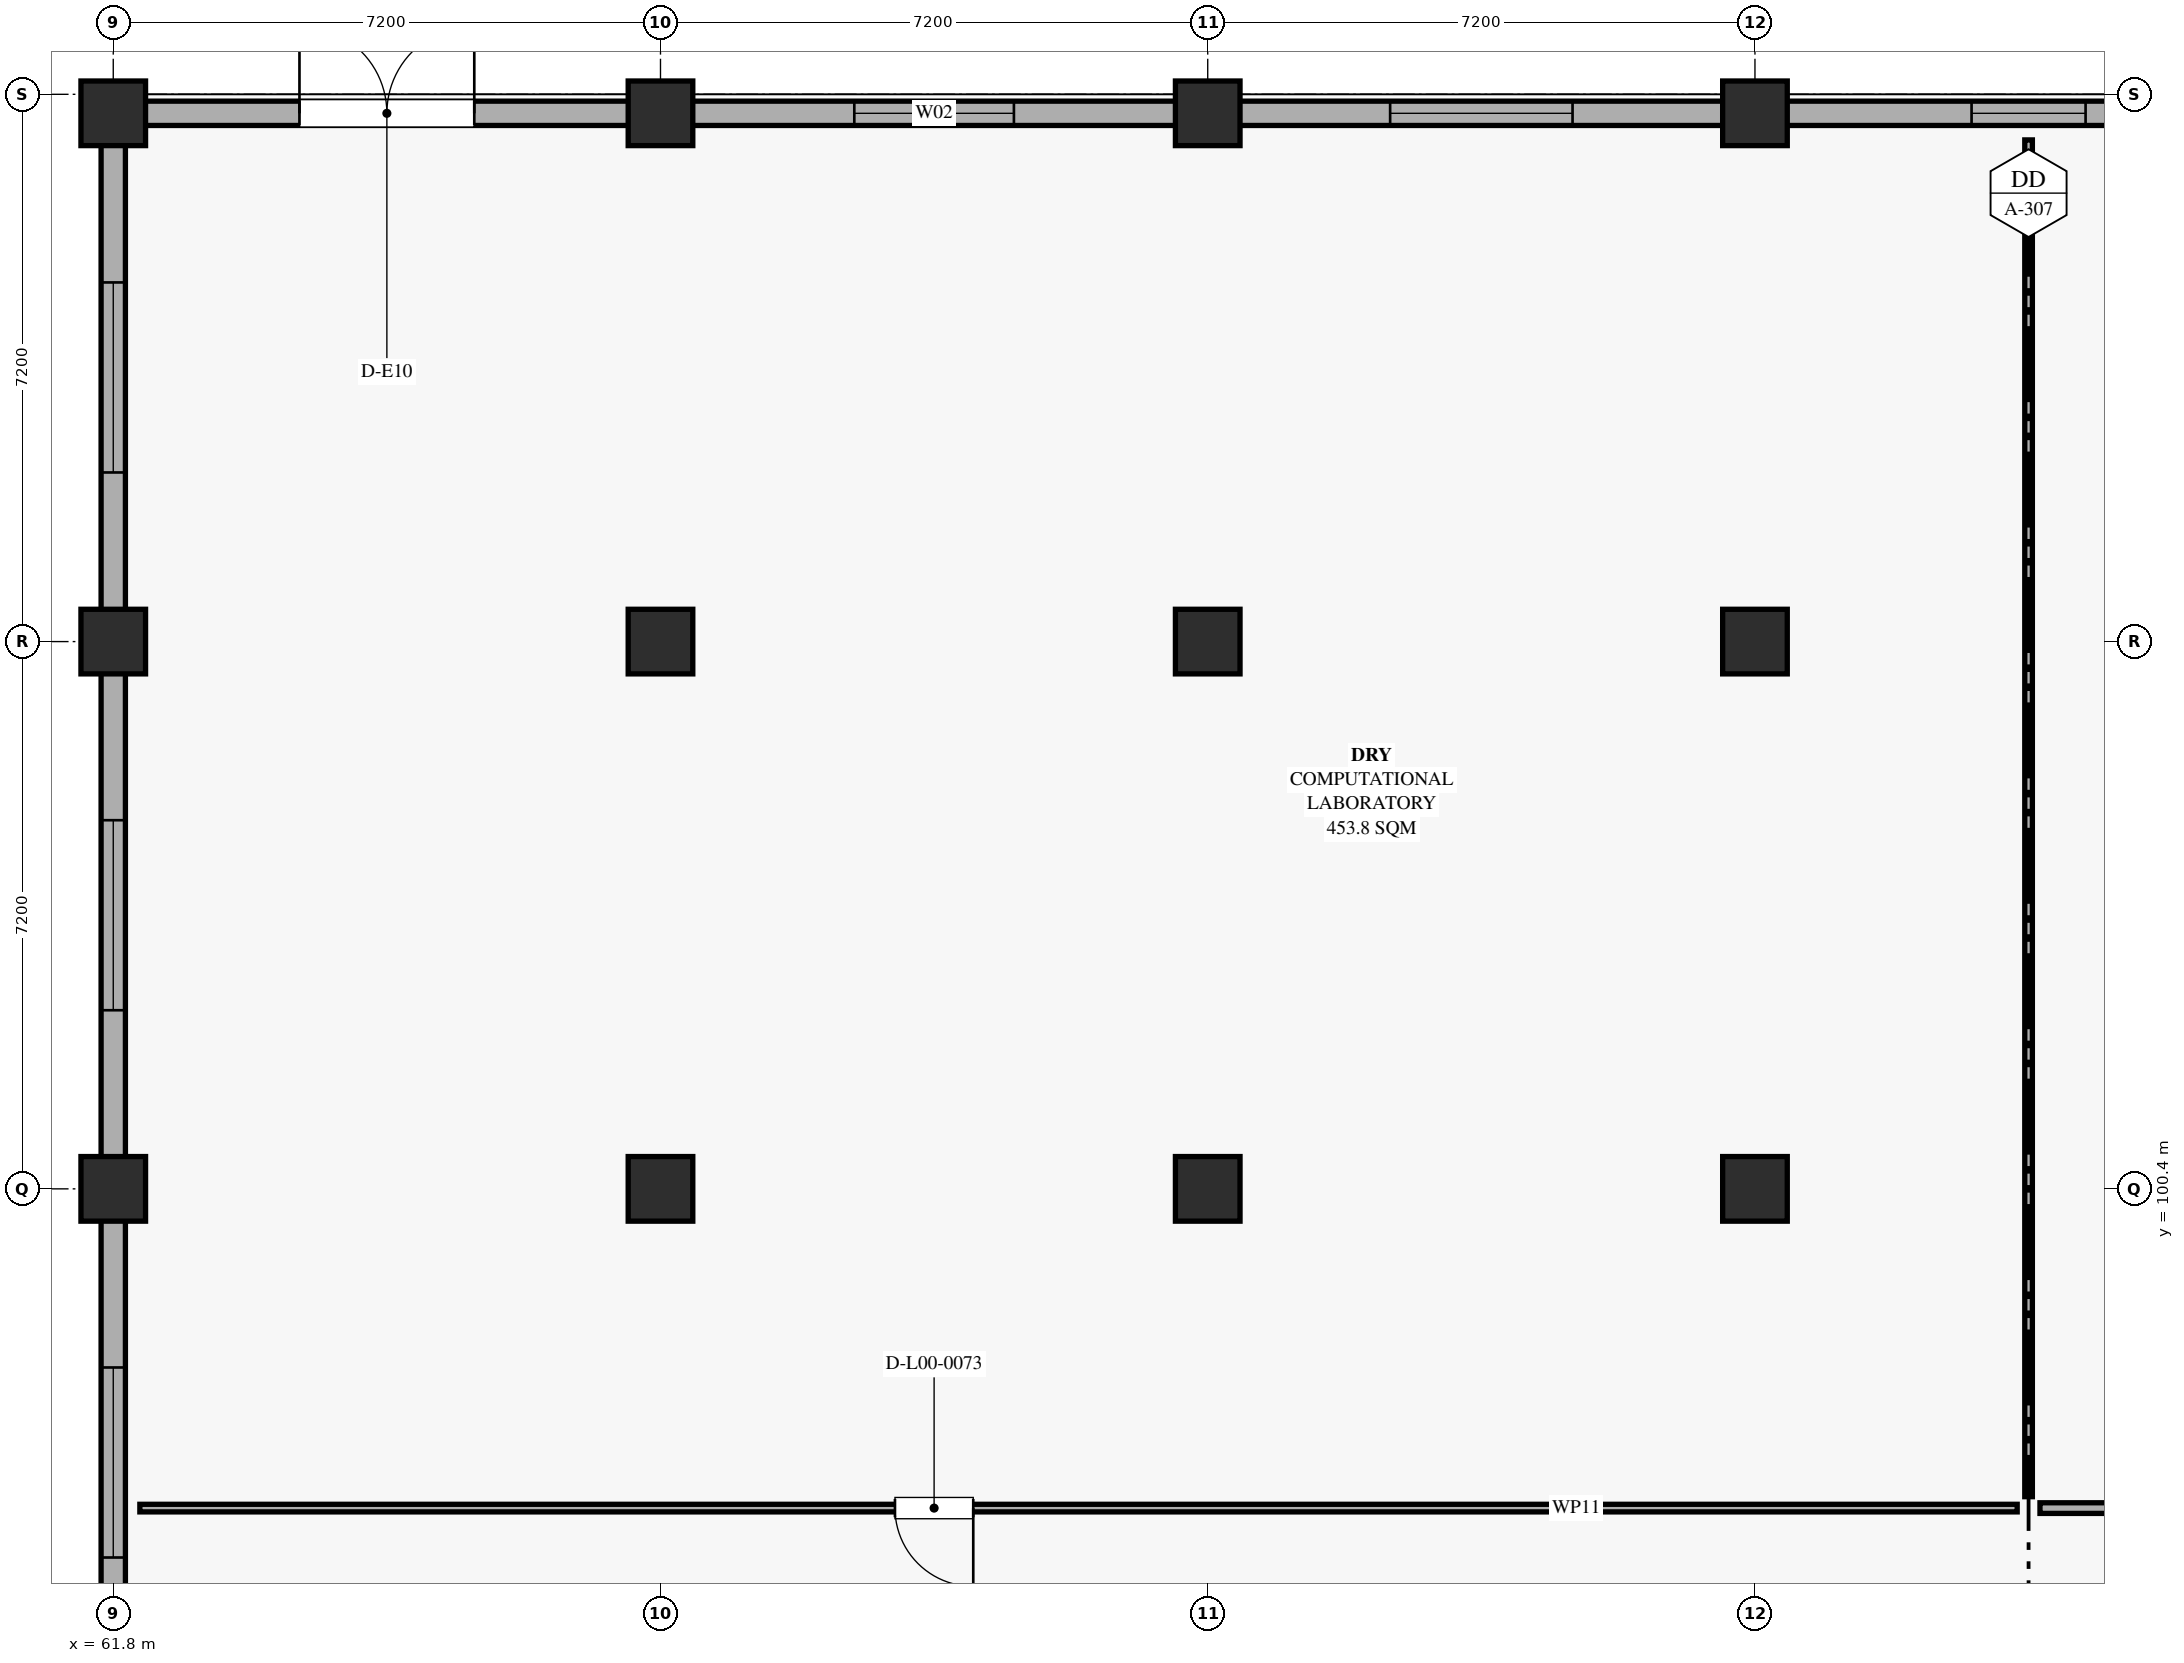
"""IFC4 building model, lengths in metres.
Left out: names, types, materials, properties, quantities, classifications, styles, units other than length and angle.
Written with IfcOpenShell. Run it as: python <this file> out.ifc"""

import sys

from ifc_helpers import new_model, si_unit, direction, frame, frame_2d, origin, origin_2d, place, context, subcontext, project, spatial, rectangle, extrude, element, fill, save


model = new_model("IFC4")
c1 = context("Model", 3, precision=1e-05, world=origin(), true_north=direction((0.0, 1.0)))
c2 = subcontext(c1, "Body", "Model", "MODEL_VIEW")
j1 = project(units=[si_unit("LENGTHUNIT", "METRE"), si_unit("PLANEANGLEUNIT", "RADIAN")], contexts=[c1])
p1 = place(None, origin())
s1 = spatial("IfcSite", under=j1, at=p1, CompositionType="ELEMENT")
p2 = place(p1, origin())
s2 = spatial("IfcBuilding", under=s1, at=p2, CompositionType="ELEMENT")
p3 = place(p2, origin())
s3 = spatial("IfcBuildingStorey", under=s2, at=p3, CompositionType="ELEMENT", Elevation=0.0)
for number, where, z_axis, x_axis in (
    (1, (61.8, 100.4, 0.0), (0.0, 0.0, 1.0), (1.0, 0.0, 0.0)),
    (2, (69.0, 100.4, 0.0), (0.0, 0.0, 1.0), (1.0, 0.0, 0.0)),
    (3, (76.2, 100.4, 0.0), (0.0, 0.0, 1.0), (1.0, 0.0, 0.0)),
    (4, (83.4, 100.4, 0.0), (0.0, 0.0, 1.0), (1.0, 0.0, 0.0)),
    (5, (61.8, 107.6, 0.0), (0.0, 0.0, 1.0), (1.0, 0.0, 0.0)),
    (6, (69.0, 107.6, 0.0), (0.0, 0.0, 1.0), (1.0, 0.0, 0.0)),
    (7, (76.2, 107.6, 0.0), (0.0, 0.0, 1.0), (1.0, 0.0, 0.0)),
    (8, (83.4, 107.6, 0.0), (0.0, 0.0, 1.0), (1.0, 0.0, 0.0)),
    (9, (61.8, 114.55, 0.0), (0.0, 0.0, 1.0), (1.0, 0.0, 0.0)),
    (10, (69.0, 114.55, 0.0), (0.0, 0.0, 1.0), (1.0, 0.0, 0.0)),
    (11, (76.2, 114.55, 0.0), (0.0, 0.0, 1.0), (1.0, 0.0, 0.0)),
    (12, (83.4, 114.55, 0.0), (0.0, 0.0, 1.0), (1.0, 0.0, 0.0)),
):
    element("IfcColumn", number, at=place(p3, frame(where, z_axis=z_axis, x_axis=x_axis)), inside=s3, PredefinedType="COLUMN", context=c2, shape_type="SweptSolid", body=[
        extrude(rectangle(XDim=0.85, YDim=0.85, at=origin_2d()), origin(), (0.0, 0.0, 1.0), 5.4),
    ])
p4 = place(p3, frame((61.8, 93.61, 0.0), z_axis=(0.0, 0.0, 1.0), x_axis=(0.0, 1.0, 0.0)))
e13 = element("IfcWall", 13, at=p4, inside=s3, PredefinedType="SOLIDWALL", context=c2, shape_type="SweptSolid", body=[
    extrude(rectangle(XDim=6.38, YDim=0.32, at=frame_2d((3.19, 0.0))), origin(), (0.0, 0.0, 1.0), 3.9),
])
p5 = place(p4, frame((1.94, 0.0, 0.9)))
e14 = element("IfcOpeningElement", 14, at=p5, cuts=e13, PredefinedType="OPENING", context=c2, shape_type="SweptSolid", body=[
    extrude(rectangle(XDim=2.5, YDim=2.2, at=frame_2d((1.25, 1.1))), frame((0.0, 0.17, 0.0), z_axis=(0.0, -1.0, 0.0), x_axis=(1.0, 0.0, 0.0)), (0.0, 0.0, 1.0), 0.34),
])
p6 = place(p3, frame((61.8, 100.81, 0.0), z_axis=(0.0, 0.0, 1.0), x_axis=(0.0, 1.0, 0.0)))
e15 = element("IfcWall", 15, at=p6, inside=s3, PredefinedType="SOLIDWALL", context=c2, shape_type="SweptSolid", body=[
    extrude(rectangle(XDim=6.38, YDim=0.32, at=frame_2d((3.19, 0.0))), origin(), (0.0, 0.0, 1.0), 3.9),
])
p7 = place(p6, frame((1.94, 0.0, 0.9)))
e16 = element("IfcOpeningElement", 16, at=p7, cuts=e15, PredefinedType="OPENING", context=c2, shape_type="SweptSolid", body=[
    extrude(rectangle(XDim=2.5, YDim=2.2, at=frame_2d((1.25, 1.1))), frame((0.0, 0.17, 0.0), z_axis=(0.0, -1.0, 0.0), x_axis=(1.0, 0.0, 0.0)), (0.0, 0.0, 1.0), 0.34),
])
p8 = place(p3, frame((61.8, 108.01, 0.0), z_axis=(0.0, 0.0, 1.0), x_axis=(0.0, 1.0, 0.0)))
e17 = element("IfcWall", 17, at=p8, inside=s3, PredefinedType="SOLIDWALL", context=c2, shape_type="SweptSolid", body=[
    extrude(rectangle(XDim=6.13, YDim=0.32, at=frame_2d((3.065, 0.0))), origin(), (0.0, 0.0, 1.0), 3.9),
])
p9 = place(p8, frame((1.815, 0.0, 0.9)))
e18 = element("IfcOpeningElement", 18, at=p9, cuts=e17, PredefinedType="OPENING", context=c2, shape_type="SweptSolid", body=[
    extrude(rectangle(XDim=2.5, YDim=2.2, at=frame_2d((1.25, 1.1))), frame((0.0, 0.17, 0.0), z_axis=(0.0, -1.0, 0.0), x_axis=(1.0, 0.0, 0.0)), (0.0, 0.0, 1.0), 0.34),
])
p10 = place(p3, frame((62.21, 114.55, 0.0), z_axis=(0.0, 0.0, 1.0), x_axis=(1.0, 0.0, 0.0)))
e19 = element("IfcWall", 19, at=p10, inside=s3, PredefinedType="SOLIDWALL", context=c2, shape_type="SweptSolid", body=[
    extrude(rectangle(XDim=6.38, YDim=0.32, at=frame_2d((3.19, 0.0))), origin(), (0.0, 0.0, 1.0), 3.9),
])
p11 = place(p10, frame((2.04, 0.0, 0.0)))
e20 = element("IfcOpeningElement", 20, at=p11, cuts=e19, PredefinedType="OPENING", context=c2, shape_type="SweptSolid", body=[
    extrude(rectangle(XDim=2.3, YDim=2.4, at=frame_2d((1.15, 1.2))), frame((0.0, 0.17, 0.0), z_axis=(0.0, -1.0, 0.0), x_axis=(1.0, 0.0, 0.0)), (0.0, 0.0, 1.0), 0.34),
])
p12 = place(p3, frame((69.41, 114.55, 0.0), z_axis=(0.0, 0.0, 1.0), x_axis=(1.0, 0.0, 0.0)))
e21 = element("IfcWall", 21, at=p12, inside=s3, PredefinedType="SOLIDWALL", context=c2, shape_type="SweptSolid", body=[
    extrude(rectangle(XDim=6.38, YDim=0.32, at=frame_2d((3.19, 0.0))), origin(), (0.0, 0.0, 1.0), 3.9),
])
p13 = place(p12, frame((2.14, 0.0, 0.9)))
e22 = element("IfcOpeningElement", 22, at=p13, cuts=e21, PredefinedType="OPENING", context=c2, shape_type="SweptSolid", body=[
    extrude(rectangle(XDim=2.1, YDim=2.4, at=frame_2d((1.05, 1.2))), frame((0.0, 0.17, 0.0), z_axis=(0.0, -1.0, 0.0), x_axis=(1.0, 0.0, 0.0)), (0.0, 0.0, 1.0), 0.34),
])
p14 = place(p3, frame((76.61, 114.55, 0.0), z_axis=(0.0, 0.0, 1.0), x_axis=(1.0, 0.0, 0.0)))
e23 = element("IfcWall", 23, at=p14, inside=s3, PredefinedType="SOLIDWALL", context=c2, shape_type="SweptSolid", body=[
    extrude(rectangle(XDim=6.38, YDim=0.32, at=frame_2d((3.19, 0.0))), origin(), (0.0, 0.0, 1.0), 3.9),
])
p15 = place(p14, frame((1.99, 0.0, 0.9)))
e24 = element("IfcOpeningElement", 24, at=p15, cuts=e23, PredefinedType="OPENING", context=c2, shape_type="SweptSolid", body=[
    extrude(rectangle(XDim=2.4, YDim=2.4, at=frame_2d((1.2, 1.2))), frame((0.0, 0.17, 0.0), z_axis=(0.0, -1.0, 0.0), x_axis=(1.0, 0.0, 0.0)), (0.0, 0.0, 1.0), 0.34),
])
p16 = place(p3, frame((83.81, 114.55, 0.0), z_axis=(0.0, 0.0, 1.0), x_axis=(1.0, 0.0, 0.0)))
e25 = element("IfcWall", 25, at=p16, inside=s3, PredefinedType="SOLIDWALL", context=c2, shape_type="SweptSolid", body=[
    extrude(rectangle(XDim=6.38, YDim=0.32, at=frame_2d((3.19, 0.0))), origin(), (0.0, 0.0, 1.0), 3.9),
])
p17 = place(p16, frame((2.44, 0.0, 0.9)))
e26 = element("IfcOpeningElement", 26, at=p17, cuts=e25, PredefinedType="OPENING", context=c2, shape_type="SweptSolid", body=[
    extrude(rectangle(XDim=1.5, YDim=2.4, at=frame_2d((0.75, 1.2))), frame((0.0, 0.17, 0.0), z_axis=(0.0, -1.0, 0.0), x_axis=(1.0, 0.0, 0.0)), (0.0, 0.0, 1.0), 0.34),
])
p18 = place(p3, frame((86.85, 96.2, 0.0), z_axis=(0.0, 0.0, 1.0), x_axis=(-1.0, 0.0, 0.0)))
e27 = element("IfcWall", 27, at=p18, inside=s3, PredefinedType="PARTITIONING", context=c2, shape_type="SweptSolid", body=[
    extrude(rectangle(XDim=24.7, YDim=0.1, at=frame_2d((12.35, 0.0))), origin(), (0.0, 0.0, 1.0), 3.88),
])
p19 = place(p18, frame((13.735, 0.0, 0.0)))
e28 = element("IfcOpeningElement", 28, at=p19, cuts=e27, PredefinedType="OPENING", context=c2, shape_type="SweptSolid", body=[
    extrude(rectangle(XDim=1.03, YDim=2.16, at=frame_2d((0.515, 1.08))), frame((0.0, 0.06, 0.0), z_axis=(0.0, -1.0, 0.0), x_axis=(1.0, 0.0, 0.0)), (0.0, 0.0, 1.0), 0.12),
])
p20 = place(p3, frame((87.0, 114.2, 0.0), z_axis=(0.0, 0.0, 1.0), x_axis=(0.0, -1.0, 0.0)))
e29 = element("IfcWall", 29, at=p20, inside=s3, PredefinedType="PARTITIONING", context=c2, shape_type="SweptSolid", body=[
    extrude(rectangle(XDim=17.85, YDim=0.1, at=frame_2d((8.925, 0.0))), origin(), (0.0, 0.0, 1.0), 3.88),
])
p21 = place(p3, frame((111.85, 96.2, 0.0), z_axis=(0.0, 0.0, 1.0), x_axis=(-1.0, 0.0, 0.0)))
e30 = element("IfcWall", 30, at=p21, inside=s3, PredefinedType="PARTITIONING", context=c2, shape_type="SweptSolid", body=[
    extrude(rectangle(XDim=24.7, YDim=0.14, at=frame_2d((12.35, 0.0))), origin(), (0.0, 0.0, 1.0), 3.88),
])
p22 = place(p21, frame((9.935, 0.0, 0.0)))
e31 = element("IfcOpeningElement", 31, at=p22, cuts=e30, PredefinedType="OPENING", context=c2, shape_type="SweptSolid", body=[
    extrude(rectangle(XDim=1.03, YDim=2.22, at=frame_2d((0.515, 1.11))), frame((0.0, 0.08, 0.0), z_axis=(0.0, -1.0, 0.0), x_axis=(1.0, 0.0, 0.0)), (0.0, 0.0, 1.0), 0.16),
])
p23 = place(p5, origin())
e32 = element("IfcWindow", 32, at=p23, inside=s3, PartitioningType="DOUBLE_PANEL_VERTICAL", PredefinedType="WINDOW", context=c2, shape_type="SweptSolid", body=[
    extrude(rectangle(XDim=2.5, YDim=2.2, at=frame_2d((1.25, 1.1))), frame((0.0, 0.03, 0.0), z_axis=(0.0, -1.0, 0.0), x_axis=(1.0, 0.0, 0.0)), (0.0, 0.0, 1.0), 0.06),
])
fill(e14, e32)
p24 = place(p7, origin())
e33 = element("IfcWindow", 33, at=p24, inside=s3, PartitioningType="DOUBLE_PANEL_VERTICAL", PredefinedType="WINDOW", context=c2, shape_type="SweptSolid", body=[
    extrude(rectangle(XDim=2.5, YDim=2.2, at=frame_2d((1.25, 1.1))), frame((0.0, 0.03, 0.0), z_axis=(0.0, -1.0, 0.0), x_axis=(1.0, 0.0, 0.0)), (0.0, 0.0, 1.0), 0.06),
])
fill(e16, e33)
p25 = place(p9, origin())
e34 = element("IfcWindow", 34, at=p25, inside=s3, PartitioningType="DOUBLE_PANEL_VERTICAL", PredefinedType="WINDOW", context=c2, shape_type="SweptSolid", body=[
    extrude(rectangle(XDim=2.5, YDim=2.2, at=frame_2d((1.25, 1.1))), frame((0.0, 0.03, 0.0), z_axis=(0.0, -1.0, 0.0), x_axis=(1.0, 0.0, 0.0)), (0.0, 0.0, 1.0), 0.06),
])
fill(e18, e34)
p26 = place(p11, origin())
e35 = element("IfcDoor", 35, at=p26, inside=s3, OperationType="DOUBLE_DOOR_SINGLE_SWING", PredefinedType="DOOR", context=c2, shape_type="SweptSolid", body=[
    extrude(rectangle(XDim=2.3, YDim=2.4, at=frame_2d((1.15, 1.2))), frame((0.0, 0.025, 0.0), z_axis=(0.0, -1.0, 0.0), x_axis=(1.0, 0.0, 0.0)), (0.0, 0.0, 1.0), 0.05),
])
fill(e20, e35)
p27 = place(p13, origin())
e36 = element("IfcWindow", 36, at=p27, inside=s3, PartitioningType="DOUBLE_PANEL_VERTICAL", PredefinedType="WINDOW", context=c2, shape_type="SweptSolid", body=[
    extrude(rectangle(XDim=2.1, YDim=2.4, at=frame_2d((1.05, 1.2))), frame((0.0, 0.03, 0.0), z_axis=(0.0, -1.0, 0.0), x_axis=(1.0, 0.0, 0.0)), (0.0, 0.0, 1.0), 0.06),
])
fill(e22, e36)
p28 = place(p15, origin())
e37 = element("IfcWindow", 37, at=p28, inside=s3, PartitioningType="DOUBLE_PANEL_VERTICAL", PredefinedType="WINDOW", context=c2, shape_type="SweptSolid", body=[
    extrude(rectangle(XDim=2.4, YDim=2.4, at=frame_2d((1.2, 1.2))), frame((0.0, 0.03, 0.0), z_axis=(0.0, -1.0, 0.0), x_axis=(1.0, 0.0, 0.0)), (0.0, 0.0, 1.0), 0.06),
])
fill(e24, e37)
p29 = place(p17, origin())
e38 = element("IfcWindow", 38, at=p29, inside=s3, PartitioningType="SINGLE_PANEL", PredefinedType="WINDOW", context=c2, shape_type="SweptSolid", body=[
    extrude(rectangle(XDim=1.5, YDim=2.4, at=frame_2d((0.75, 1.2))), frame((0.0, 0.03, 0.0), z_axis=(0.0, -1.0, 0.0), x_axis=(1.0, 0.0, 0.0)), (0.0, 0.0, 1.0), 0.06),
])
fill(e26, e38)
p30 = place(p19, origin())
e39 = element("IfcDoor", 39, at=p30, inside=s3, OperationType="SINGLE_SWING_LEFT", PredefinedType="DOOR", context=c2, shape_type="SweptSolid", body=[
    extrude(rectangle(XDim=1.03, YDim=2.16, at=frame_2d((0.515, 1.08))), frame((0.0, 0.025, 0.0), z_axis=(0.0, -1.0, 0.0), x_axis=(1.0, 0.0, 0.0)), (0.0, 0.0, 1.0), 0.05),
])
fill(e28, e39)
save(model, sys.argv[1])
